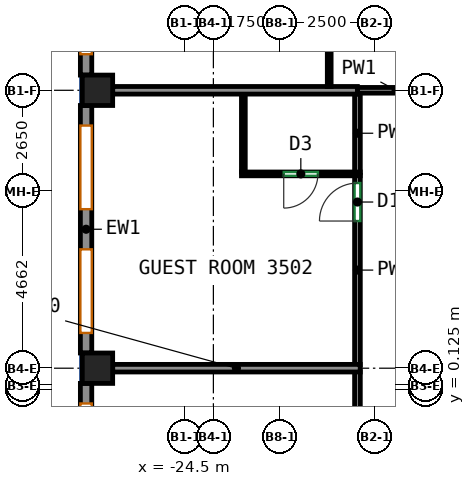
"""IFC4 building model, lengths in metres.
Left out: names, types, materials, properties, quantities, classifications, styles, units other than length and angle.
Written with IfcOpenShell. Run it as: python <this file> out.ifc"""

import sys

from ifc_helpers import new_model, si_unit, direction, frame, frame_2d, origin, origin_2d, place, context, subcontext, project, spatial, rectangle, extrude, source, transform, mapped, element, fill, save


model = new_model("IFC4")
c1 = context("Model", 3, precision=1e-05, world=origin(), true_north=direction((0.0, 1.0)))
c2 = subcontext(c1, "Body", "Model", "MODEL_VIEW")
j1 = project(units=[si_unit("LENGTHUNIT", "METRE"), si_unit("PLANEANGLEUNIT", "RADIAN")], contexts=[c1])
p1 = place(None, origin())
s1 = spatial("IfcSite", under=j1, at=p1, CompositionType="ELEMENT")
p2 = place(p1, origin())
s2 = spatial("IfcBuilding", under=s1, at=p2, CompositionType="ELEMENT")
p3 = place(p2, frame((0.0, 0.0, 154.1)))
s3 = spatial("IfcBuildingStorey", under=s2, at=p3, CompositionType="ELEMENT", Elevation=154.1)
m1 = source(origin(), c2, "Body", "SweptSolid", [
    extrude(rectangle(XDim=0.8, YDim=0.8, at=origin_2d()), origin(), (0.0, 0.0, 1.0), 3.12),
])
for number, where, z_axis, x_axis in (
    (1, (-26.8, 0.688, 0.0), (0.0, 0.0, 1.0), (1.0, 0.0, 0.0)),
    (2, (-26.8, 8.0, 0.0), (0.0, 0.0, 1.0), (1.0, 0.0, 0.0)),
):
    element("IfcColumn", number, at=place(p3, frame(where, z_axis=z_axis, x_axis=x_axis)), inside=s3, PredefinedType="COLUMN", context=c2, shape_type="MappedRepresentation", body=[
        mapped(m1, transform((0.0, 0.0, 0.0))),
    ])
m2 = source(origin(), c2, "Body", "SweptSolid", [
    extrude(rectangle(XDim=13.2, YDim=0.3, at=frame_2d((6.6, 0.0))), origin(), (0.0, 0.0, 1.0), 3.12),
])
p4 = place(p3, frame((-27.1, 21.6, 0.0), z_axis=(0.0, 0.0, 1.0), x_axis=(0.0, -1.0, 0.0)))
e3 = element("IfcWall", 3, at=p4, inside=s3, PredefinedType="SOLIDWALL", context=c2, shape_type="MappedRepresentation", body=[
    mapped(m2, transform((0.0, 0.0, 0.0))),
])
p5 = place(p4, frame((0.55, 0.0, 0.85)))
e4 = element("IfcOpeningElement", 4, at=p5, cuts=e3, PredefinedType="OPENING", context=c2, shape_type="SweptSolid", body=[
    extrude(rectangle(XDim=2.2, YDim=1.95, at=frame_2d((1.1, 0.975))), frame((0.0, 0.16, 0.0), z_axis=(0.0, -1.0, 0.0), x_axis=(1.0, 0.0, 0.0)), (0.0, 0.0, 1.0), 0.32),
])
p6 = place(p4, frame((3.85, 0.0, 0.85)))
e5 = element("IfcOpeningElement", 5, at=p6, cuts=e3, PredefinedType="OPENING", context=c2, shape_type="SweptSolid", body=[
    extrude(rectangle(XDim=2.2, YDim=1.95, at=frame_2d((1.1, 0.975))), frame((0.0, 0.16, 0.0), z_axis=(0.0, -1.0, 0.0), x_axis=(1.0, 0.0, 0.0)), (0.0, 0.0, 1.0), 0.32),
])
p7 = place(p4, frame((7.15, 0.0, 0.85)))
e6 = element("IfcOpeningElement", 6, at=p7, cuts=e3, PredefinedType="OPENING", context=c2, shape_type="SweptSolid", body=[
    extrude(rectangle(XDim=2.2, YDim=1.95, at=frame_2d((1.1, 0.975))), frame((0.0, 0.16, 0.0), z_axis=(0.0, -1.0, 0.0), x_axis=(1.0, 0.0, 0.0)), (0.0, 0.0, 1.0), 0.32),
])
p8 = place(p4, frame((10.45, 0.0, 0.85)))
e7 = element("IfcOpeningElement", 7, at=p8, cuts=e3, PredefinedType="OPENING", context=c2, shape_type="SweptSolid", body=[
    extrude(rectangle(XDim=2.2, YDim=1.95, at=frame_2d((1.1, 0.975))), frame((0.0, 0.16, 0.0), z_axis=(0.0, -1.0, 0.0), x_axis=(1.0, 0.0, 0.0)), (0.0, 0.0, 1.0), 0.32),
])
m3 = source(origin(), c2, "Body", "SweptSolid", [
    extrude(rectangle(XDim=6.513, YDim=0.3, at=frame_2d((3.256, 0.0))), origin(), (0.0, 0.0, 1.0), 3.12),
])
p9 = place(p3, frame((-27.1, 7.6, 0.0), z_axis=(0.0, 0.0, 1.0), x_axis=(0.0, -1.0, 0.0)))
e8 = element("IfcWall", 8, at=p9, inside=s3, PredefinedType="SOLIDWALL", context=c2, shape_type="MappedRepresentation", body=[
    mapped(m3, transform((0.0, 0.0, 0.0))),
])
p10 = place(p9, frame((0.528, 0.0, 0.85)))
e9 = element("IfcOpeningElement", 9, at=p10, cuts=e8, PredefinedType="OPENING", context=c2, shape_type="SweptSolid", body=[
    extrude(rectangle(XDim=2.2, YDim=1.95, at=frame_2d((1.1, 0.975))), frame((0.0, 0.16, 0.0), z_axis=(0.0, -1.0, 0.0), x_axis=(1.0, 0.0, 0.0)), (0.0, 0.0, 1.0), 0.32),
])
p11 = place(p9, frame((3.784, 0.0, 0.85)))
e10 = element("IfcOpeningElement", 10, at=p11, cuts=e8, PredefinedType="OPENING", context=c2, shape_type="SweptSolid", body=[
    extrude(rectangle(XDim=2.2, YDim=1.95, at=frame_2d((1.1, 0.975))), frame((0.0, 0.16, 0.0), z_axis=(0.0, -1.0, 0.0), x_axis=(1.0, 0.0, 0.0)), (0.0, 0.0, 1.0), 0.32),
])
p12 = place(p3, frame((-27.1, 0.288, 0.0), z_axis=(0.0, 0.0, 1.0), x_axis=(0.0, -1.0, 0.0)))
e11 = element("IfcWall", 11, at=p12, inside=s3, PredefinedType="SOLIDWALL", context=c2, shape_type="MappedRepresentation", body=[
    mapped(m3, transform((0.0, 0.0, 0.0))),
])
p13 = place(p12, frame((0.528, 0.0, 0.85)))
e12 = element("IfcOpeningElement", 12, at=p13, cuts=e11, PredefinedType="OPENING", context=c2, shape_type="SweptSolid", body=[
    extrude(rectangle(XDim=2.2, YDim=1.95, at=frame_2d((1.1, 0.975))), frame((0.0, 0.16, 0.0), z_axis=(0.0, -1.0, 0.0), x_axis=(1.0, 0.0, 0.0)), (0.0, 0.0, 1.0), 0.32),
])
p14 = place(p12, frame((3.784, 0.0, 0.85)))
e13 = element("IfcOpeningElement", 13, at=p14, cuts=e11, PredefinedType="OPENING", context=c2, shape_type="SweptSolid", body=[
    extrude(rectangle(XDim=2.2, YDim=1.95, at=frame_2d((1.1, 0.975))), frame((0.0, 0.16, 0.0), z_axis=(0.0, -1.0, 0.0), x_axis=(1.0, 0.0, 0.0)), (0.0, 0.0, 1.0), 0.32),
])
p15 = place(p3, frame((-19.959, -4.385, 0.0), z_axis=(0.0, 0.0, 1.0), x_axis=(0.0, 1.0, 0.0)))
e14 = element("IfcWall", 14, at=p15, inside=s3, PredefinedType="PARTITIONING", context=c2, shape_type="SweptSolid", body=[
    extrude(rectangle(XDim=4.983, YDim=0.15, at=frame_2d((2.491, 0.0))), origin(), (0.0, 0.0, 1.0), 3.12),
])
p16 = place(p15, frame((0.712, 0.0, 0.0)))
e15 = element("IfcOpeningElement", 15, at=p16, cuts=e14, PredefinedType="OPENING", context=c2, shape_type="SweptSolid", body=[
    extrude(rectangle(XDim=1.0, YDim=2.1, at=frame_2d((0.5, 1.05))), frame((0.0, 0.085, 0.0), z_axis=(0.0, -1.0, 0.0), x_axis=(1.0, 0.0, 0.0)), (0.0, 0.0, 1.0), 0.17),
])
p17 = place(p3, frame((-19.959, 0.778, 0.0), z_axis=(0.0, 0.0, 1.0), x_axis=(0.0, 1.0, 0.0)))
e16 = element("IfcWall", 16, at=p17, inside=s3, PredefinedType="PARTITIONING", context=c2, shape_type="SweptSolid", body=[
    extrude(rectangle(XDim=4.982, YDim=0.15, at=frame_2d((2.491, 0.0))), origin(), (0.0, 0.0, 1.0), 3.12),
])
p18 = place(p17, frame((3.782, 0.0, 0.0)))
e17 = element("IfcOpeningElement", 17, at=p18, cuts=e16, PredefinedType="OPENING", context=c2, shape_type="SweptSolid", body=[
    extrude(rectangle(XDim=1.0, YDim=2.1, at=frame_2d((0.5, 1.05))), frame((0.0, 0.085, 0.0), z_axis=(0.0, -1.0, 0.0), x_axis=(1.0, 0.0, 0.0)), (0.0, 0.0, 1.0), 0.17),
])
p19 = place(p3, frame((-19.959, 5.84, 0.0), z_axis=(0.0, 0.0, 1.0), x_axis=(0.0, 1.0, 0.0)))
e18 = element("IfcWall", 18, at=p19, inside=s3, PredefinedType="PARTITIONING", context=c2, shape_type="SweptSolid", body=[
    extrude(rectangle(XDim=2.06, YDim=0.15, at=frame_2d((1.03, 0.0))), origin(), (0.0, 0.0, 1.0), 3.12),
])
p20 = place(p3, frame((-17.925, 8.0, 0.0), z_axis=(0.0, 0.0, 1.0), x_axis=(-1.0, 0.0, 0.0)))
e19 = element("IfcWall", 19, at=p20, inside=s3, PredefinedType="PARTITIONING", context=c2, shape_type="SweptSolid", body=[
    extrude(rectangle(XDim=2.034, YDim=0.15, at=frame_2d((1.017, 0.0))), origin(), (0.0, 0.0, 1.0), 3.12),
])
p21 = place(p3, frame((-26.4, 0.688, 0.0), z_axis=(0.0, 0.0, 1.0), x_axis=(1.0, 0.0, 0.0)))
e20 = element("IfcWall", 20, at=p21, inside=s3, PredefinedType="PARTITIONING", context=c2, shape_type="SweptSolid", body=[
    extrude(rectangle(XDim=6.514, YDim=0.2, at=frame_2d((3.257, 0.0))), origin(), (0.0, 0.0, 1.0), 2.52),
])
p22 = place(p3, frame((-22.961, 5.85, 0.0), z_axis=(0.0, 0.0, 1.0), x_axis=(0.0, 1.0, 0.0)))
e21 = element("IfcWall", 21, at=p22, inside=s3, PredefinedType="PARTITIONING", context=c2, shape_type="SweptSolid", body=[
    extrude(rectangle(XDim=2.05, YDim=0.1, at=frame_2d((1.025, 0.0))), origin(), (0.0, 0.0, 1.0), 3.12),
])
p23 = place(p3, frame((-19.886, 5.8, 0.0), z_axis=(0.0, 0.0, 1.0), x_axis=(-1.0, 0.0, 0.0)))
e22 = element("IfcWall", 22, at=p23, inside=s3, PredefinedType="PARTITIONING", context=c2, shape_type="SweptSolid", body=[
    extrude(rectangle(XDim=3.125, YDim=0.1, at=frame_2d((1.562, 0.0))), origin(), (0.0, 0.0, 1.0), 3.12),
])
p24 = place(p23, frame((1.113, 0.0, 0.0)))
e23 = element("IfcOpeningElement", 23, at=p24, cuts=e22, PredefinedType="OPENING", context=c2, shape_type="SweptSolid", body=[
    extrude(rectangle(XDim=0.9, YDim=2.1, at=frame_2d((0.45, 1.05))), frame((0.0, 0.06, 0.0), z_axis=(0.0, -1.0, 0.0), x_axis=(1.0, 0.0, 0.0)), (0.0, 0.0, 1.0), 0.12),
])
p25 = place(p3, frame((-26.4, 8.0, 0.0), z_axis=(0.0, 0.0, 1.0), x_axis=(1.0, 0.0, 0.0)))
e24 = element("IfcWall", 24, at=p25, inside=s3, PredefinedType="PARTITIONING", context=c2, shape_type="SweptSolid", body=[
    extrude(rectangle(XDim=6.439, YDim=0.2, at=frame_2d((3.219, 0.0))), origin(), (0.0, 0.0, 1.0), 3.12),
])
p26 = place(p3, frame((-20.702, 8.1, 0.0), z_axis=(0.0, 0.0, 1.0), x_axis=(0.0, 1.0, 0.0)))
e25 = element("IfcWall", 25, at=p26, inside=s3, PredefinedType="PARTITIONING", context=c2, shape_type="SweptSolid", body=[
    extrude(rectangle(XDim=1.85, YDim=0.1, at=frame_2d((0.925, 0.0))), origin(), (0.0, 0.0, 1.0), 3.12),
])
p27 = place(p8, origin())
e26 = element("IfcWindow", 26, at=p27, inside=s3, PartitioningType="SINGLE_PANEL", PredefinedType="WINDOW", context=c2, shape_type="SweptSolid", body=[
    extrude(rectangle(XDim=2.2, YDim=1.95, at=frame_2d((1.1, 0.975))), frame((0.0, 0.03, 0.0), z_axis=(0.0, -1.0, 0.0), x_axis=(1.0, 0.0, 0.0)), (0.0, 0.0, 1.0), 0.06),
])
fill(e7, e26)
p28 = place(p10, origin())
e27 = element("IfcWindow", 27, at=p28, inside=s3, PartitioningType="SINGLE_PANEL", PredefinedType="WINDOW", context=c2, shape_type="SweptSolid", body=[
    extrude(rectangle(XDim=2.2, YDim=1.95, at=frame_2d((1.1, 0.975))), frame((0.0, 0.03, 0.0), z_axis=(0.0, -1.0, 0.0), x_axis=(1.0, 0.0, 0.0)), (0.0, 0.0, 1.0), 0.06),
])
fill(e9, e27)
p29 = place(p11, origin())
e28 = element("IfcWindow", 28, at=p29, inside=s3, PartitioningType="SINGLE_PANEL", PredefinedType="WINDOW", context=c2, shape_type="SweptSolid", body=[
    extrude(rectangle(XDim=2.2, YDim=1.95, at=frame_2d((1.1, 0.975))), frame((0.0, 0.03, 0.0), z_axis=(0.0, -1.0, 0.0), x_axis=(1.0, 0.0, 0.0)), (0.0, 0.0, 1.0), 0.06),
])
fill(e10, e28)
p30 = place(p13, origin())
e29 = element("IfcWindow", 29, at=p30, inside=s3, PartitioningType="SINGLE_PANEL", PredefinedType="WINDOW", context=c2, shape_type="SweptSolid", body=[
    extrude(rectangle(XDim=2.2, YDim=1.95, at=frame_2d((1.1, 0.975))), frame((0.0, 0.03, 0.0), z_axis=(0.0, -1.0, 0.0), x_axis=(1.0, 0.0, 0.0)), (0.0, 0.0, 1.0), 0.06),
])
fill(e12, e29)
p31 = place(p18, origin())
e30 = element("IfcDoor", 30, at=p31, inside=s3, OperationType="SINGLE_SWING_LEFT", PredefinedType="DOOR", context=c2, shape_type="SweptSolid", body=[
    extrude(rectangle(XDim=1.0, YDim=2.1, at=frame_2d((0.5, 1.05))), frame((0.0, 0.025, 0.0), z_axis=(0.0, -1.0, 0.0), x_axis=(1.0, 0.0, 0.0)), (0.0, 0.0, 1.0), 0.05),
])
fill(e17, e30)
p32 = place(p24, origin())
e31 = element("IfcDoor", 31, at=p32, inside=s3, OperationType="SINGLE_SWING_RIGHT", PredefinedType="DOOR", context=c2, shape_type="SweptSolid", body=[
    extrude(rectangle(XDim=0.9, YDim=2.1, at=frame_2d((0.45, 1.05))), frame((0.0, 0.025, 0.0), z_axis=(0.0, -1.0, 0.0), x_axis=(1.0, 0.0, 0.0)), (0.0, 0.0, 1.0), 0.05),
])
fill(e23, e31)
save(model, sys.argv[1])
